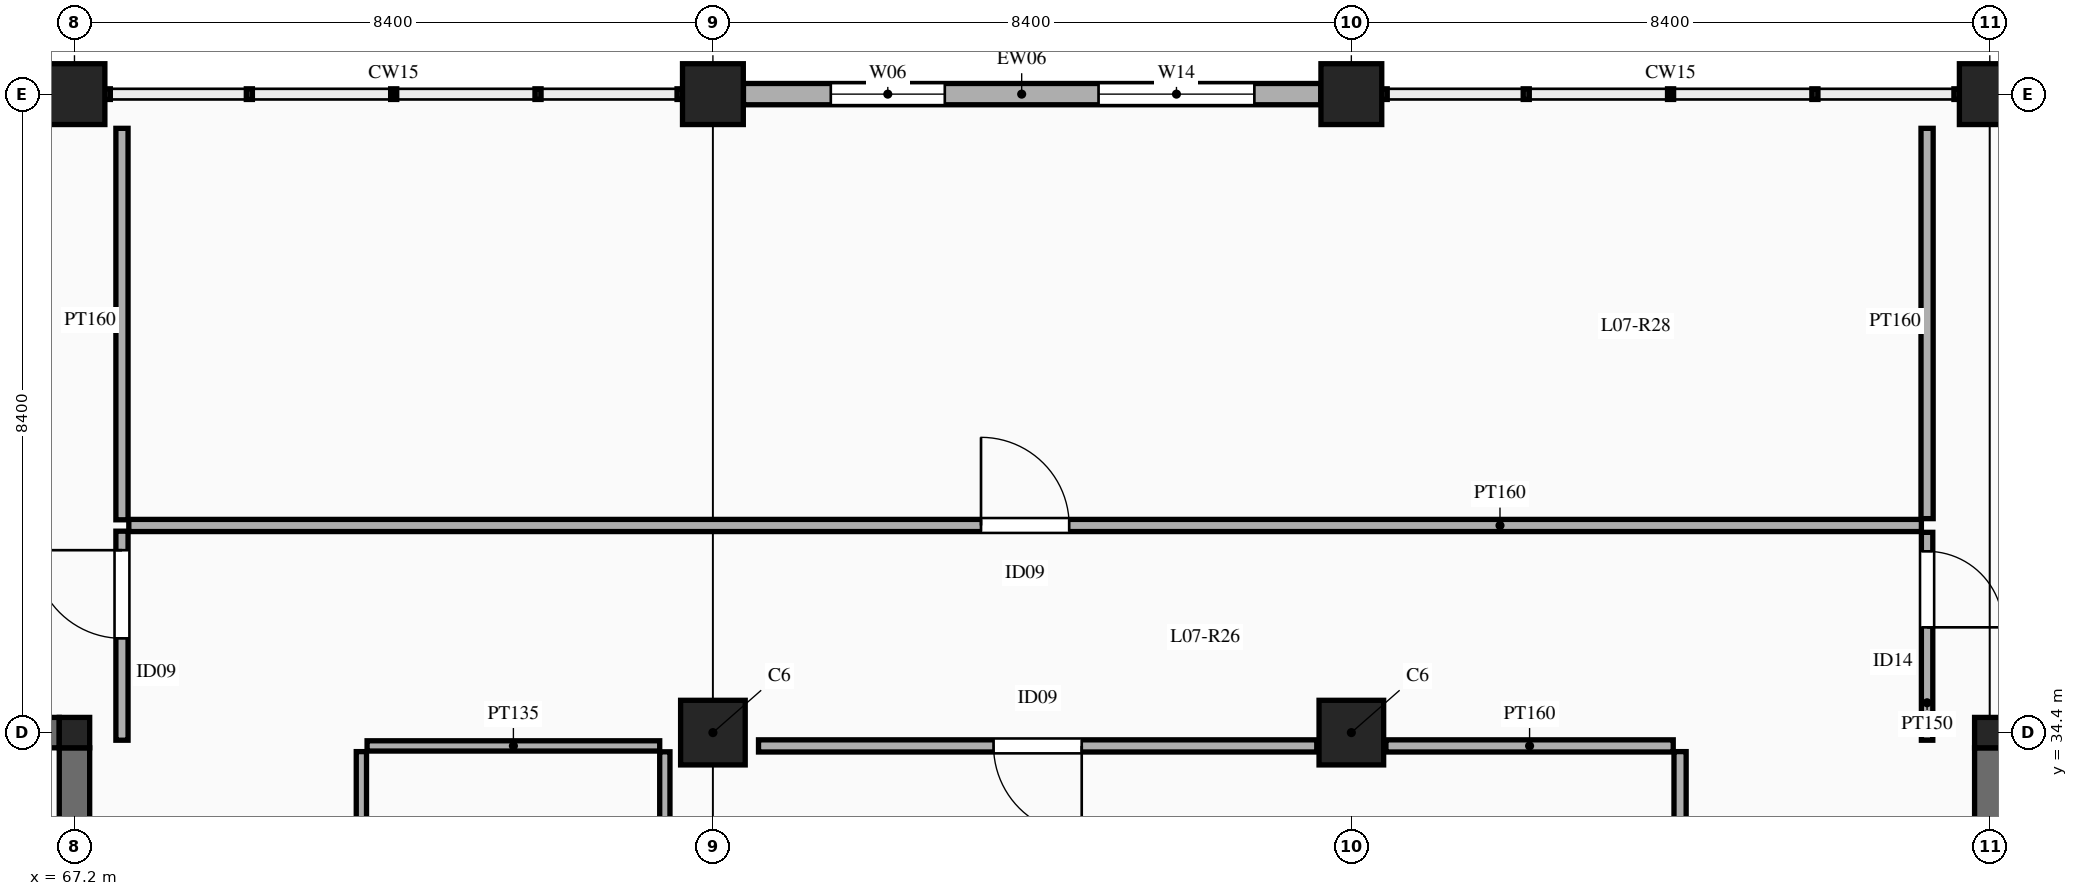
"""IFC4 building model, lengths in metres.
Left out: names, types, materials, properties, quantities, classifications, styles, units other than length and angle.
Written with IfcOpenShell. Run it as: python <this file> out.ifc"""

import sys

from ifc_helpers import new_model, si_unit, direction, frame, frame_2d, origin, origin_2d, place, context, subcontext, project, spatial, rectangle, extrude, element, fill, save


model = new_model("IFC4")
c1 = context("Model", 3, precision=1e-05, world=origin(), true_north=direction((0.0, 1.0)))
c2 = subcontext(c1, "Body", "Model", "MODEL_VIEW")
j1 = project(units=[si_unit("LENGTHUNIT", "METRE"), si_unit("PLANEANGLEUNIT", "RADIAN")], contexts=[c1])
p1 = place(None, origin())
s1 = spatial("IfcSite", under=j1, at=p1, CompositionType="ELEMENT")
p2 = place(p1, origin())
s2 = spatial("IfcBuilding", under=s1, at=p2, CompositionType="ELEMENT")
p3 = place(p2, frame((0.0, 0.0, 33.0)))
s3 = spatial("IfcBuildingStorey", under=s2, at=p3, CompositionType="ELEMENT", Elevation=33.0)
p4 = place(p3, frame((67.2, 34.4, 0.0), z_axis=(0.0, 0.0, 1.0), x_axis=(1.0, 0.0, 0.0)))
e1 = element("IfcColumn", 1, at=p4, inside=s3, PredefinedType="COLUMN", context=c2, shape_type="SweptSolid", body=[
    extrude(rectangle(XDim=0.4, YDim=0.4, at=origin_2d()), origin(), (0.0, 0.0, 1.0), 4.5),
])
p5 = place(p3, frame((67.2, 42.8, 0.0), z_axis=(0.0, 0.0, 1.0), x_axis=(1.0, 0.0, 0.0)))
e2 = element("IfcColumn", 2, at=p5, inside=s3, PredefinedType="COLUMN", context=c2, shape_type="SweptSolid", body=[
    extrude(rectangle(XDim=0.8, YDim=0.8, at=origin_2d()), origin(), (0.0, 0.0, 1.0), 4.5),
])
p6 = place(p3, frame((75.6, 34.4, 0.0), z_axis=(0.0, 0.0, 1.0), x_axis=(1.0, 0.0, 0.0)))
e3 = element("IfcColumn", 3, at=p6, inside=s3, PredefinedType="COLUMN", context=c2, shape_type="SweptSolid", body=[
    extrude(rectangle(XDim=0.85, YDim=0.85, at=origin_2d()), origin(), (0.0, 0.0, 1.0), 4.5),
])
p7 = place(p3, frame((75.6, 42.8, 0.0), z_axis=(0.0, 0.0, 1.0), x_axis=(1.0, 0.0, 0.0)))
e4 = element("IfcColumn", 4, at=p7, inside=s3, PredefinedType="COLUMN", context=c2, shape_type="SweptSolid", body=[
    extrude(rectangle(XDim=0.8, YDim=0.8, at=origin_2d()), origin(), (0.0, 0.0, 1.0), 4.5),
])
p8 = place(p3, frame((84.0, 34.4, 0.0), z_axis=(0.0, 0.0, 1.0), x_axis=(1.0, 0.0, 0.0)))
e5 = element("IfcColumn", 5, at=p8, inside=s3, PredefinedType="COLUMN", context=c2, shape_type="SweptSolid", body=[
    extrude(rectangle(XDim=0.85, YDim=0.85, at=origin_2d()), origin(), (0.0, 0.0, 1.0), 4.5),
])
p9 = place(p3, frame((84.0, 42.8, 0.0), z_axis=(0.0, 0.0, 1.0), x_axis=(1.0, 0.0, 0.0)))
e6 = element("IfcColumn", 6, at=p9, inside=s3, PredefinedType="COLUMN", context=c2, shape_type="SweptSolid", body=[
    extrude(rectangle(XDim=0.8, YDim=0.8, at=origin_2d()), origin(), (0.0, 0.0, 1.0), 4.5),
])
p10 = place(p3, frame((92.4, 34.4, 0.0), z_axis=(0.0, 0.0, 1.0), x_axis=(1.0, 0.0, 0.0)))
e7 = element("IfcColumn", 7, at=p10, inside=s3, PredefinedType="COLUMN", context=c2, shape_type="SweptSolid", body=[
    extrude(rectangle(XDim=0.4, YDim=0.4, at=origin_2d()), origin(), (0.0, 0.0, 1.0), 4.5),
])
p11 = place(p3, frame((92.4, 42.8, 0.0), z_axis=(0.0, 0.0, 1.0), x_axis=(1.0, 0.0, 0.0)))
e8 = element("IfcColumn", 8, at=p11, inside=s3, PredefinedType="COLUMN", context=c2, shape_type="SweptSolid", body=[
    extrude(rectangle(XDim=0.8, YDim=0.8, at=origin_2d()), origin(), (0.0, 0.0, 1.0), 4.5),
])
for number, where, z_axis, x_axis in (
    (9, (67.2, 26.2, 0.0), (0.0, 0.0, 1.0), (0.0, 1.0, 0.0)),
    (10, (59.0, 34.4, 0.0), (0.0, 0.0, 1.0), (1.0, 0.0, 0.0)),
    (11, (92.4, 26.2, 0.0), (0.0, 0.0, 1.0), (0.0, 1.0, 0.0)),
):
    element("IfcWall", number, at=place(p3, frame(where, z_axis=z_axis, x_axis=x_axis)), inside=s3, PredefinedType="SHEAR", context=c2, shape_type="SweptSolid", body=[
        extrude(rectangle(XDim=8.0, YDim=0.4, at=frame_2d((4.0, 0.0))), origin(), (0.0, 0.0, 1.0), 4.5),
    ])
p12 = place(p3, frame((76.002, 42.8, 0.0), z_axis=(0.0, 0.0, 1.0), x_axis=(1.0, 0.0, 0.0)))
e12 = element("IfcWall", 12, at=p12, inside=s3, PredefinedType="ELEMENTEDWALL", context=c2, shape_type="SweptSolid", body=[
    extrude(rectangle(XDim=7.596, YDim=0.28, at=frame_2d((3.798, 0.0))), origin(), (0.0, 0.0, 1.0), 3.55),
])
p13 = place(p12, frame((1.149, 0.0, 0.9)))
e13 = element("IfcOpeningElement", 13, at=p13, cuts=e12, PredefinedType="OPENING", context=c2, shape_type="SweptSolid", body=[
    extrude(rectangle(XDim=1.5, YDim=2.0, at=frame_2d((0.75, 1.0))), frame((0.0, 0.15, 0.0), z_axis=(0.0, -1.0, 0.0), x_axis=(1.0, 0.0, 0.0)), (0.0, 0.0, 1.0), 0.3),
])
p14 = place(p12, frame((4.672, 0.0, 0.9)))
e14 = element("IfcOpeningElement", 14, at=p14, cuts=e12, PredefinedType="OPENING", context=c2, shape_type="SweptSolid", body=[
    extrude(rectangle(XDim=2.05, YDim=2.1, at=frame_2d((1.025, 1.05))), frame((0.0, 0.15, 0.0), z_axis=(0.0, -1.0, 0.0), x_axis=(1.0, 0.0, 0.0)), (0.0, 0.0, 1.0), 0.3),
])
p15 = place(p3, frame((70.975, 30.25, 0.0), z_axis=(0.0, 0.0, 1.0), x_axis=(0.0, 1.0, 0.0)))
e15 = element("IfcWall", 15, at=p15, inside=s3, PredefinedType="PARTITIONING", context=c2, shape_type="SweptSolid", body=[
    extrude(rectangle(XDim=3.9, YDim=0.135, at=frame_2d((1.95, 0.0))), origin(), (0.0, 0.0, 1.0), 3.45),
])
p16 = place(p15, frame((1.46, 0.0, 0.0)))
e16 = element("IfcOpeningElement", 16, at=p16, cuts=e15, PredefinedType="OPENING", context=c2, shape_type="SweptSolid", body=[
    extrude(rectangle(XDim=0.98, YDim=2.15, at=frame_2d((0.49, 1.075))), frame((0.0, 0.077, 0.0), z_axis=(0.0, -1.0, 0.0), x_axis=(1.0, 0.0, 0.0)), (0.0, 0.0, 1.0), 0.155),
])
p17 = place(p3, frame((71.05, 34.225, 0.0), z_axis=(0.0, 0.0, 1.0), x_axis=(1.0, 0.0, 0.0)))
e17 = element("IfcWall", 17, at=p17, inside=s3, PredefinedType="PARTITIONING", context=c2, shape_type="SweptSolid", body=[
    extrude(rectangle(XDim=3.85, YDim=0.135, at=frame_2d((1.925, 0.0))), origin(), (0.0, 0.0, 1.0), 3.45),
])
p18 = place(p3, frame((88.325, 29.45, 0.0), z_axis=(0.0, 0.0, 1.0), x_axis=(0.0, 1.0, 0.0)))
e18 = element("IfcWall", 18, at=p18, inside=s3, PredefinedType="PARTITIONING", context=c2, shape_type="SweptSolid", body=[
    extrude(rectangle(XDim=4.7, YDim=0.16, at=frame_2d((2.35, 0.0))), origin(), (0.0, 0.0, 1.0), 3.45),
])
p19 = place(p3, frame((76.2, 34.225, 0.0), z_axis=(0.0, 0.0, 1.0), x_axis=(1.0, 0.0, 0.0)))
e19 = element("IfcWall", 19, at=p19, inside=s3, PredefinedType="PARTITIONING", context=c2, shape_type="SweptSolid", body=[
    extrude(rectangle(XDim=7.345, YDim=0.16, at=frame_2d((3.672, 0.0))), origin(), (0.0, 0.0, 1.0), 3.45),
])
p20 = place(p19, frame((3.093, 0.0, 0.0)))
e20 = element("IfcOpeningElement", 20, at=p20, cuts=e19, PredefinedType="OPENING", context=c2, shape_type="SweptSolid", body=[
    extrude(rectangle(XDim=1.16, YDim=2.2, at=frame_2d((0.58, 1.1))), frame((0.0, 0.09, 0.0), z_axis=(0.0, -1.0, 0.0), x_axis=(1.0, 0.0, 0.0)), (0.0, 0.0, 1.0), 0.18),
])
p21 = place(p3, frame((84.455, 34.225, 0.0), z_axis=(0.0, 0.0, 1.0), x_axis=(1.0, 0.0, 0.0)))
e21 = element("IfcWall", 21, at=p21, inside=s3, PredefinedType="PARTITIONING", context=c2, shape_type="SweptSolid", body=[
    extrude(rectangle(XDim=3.78, YDim=0.16, at=frame_2d((1.89, 0.0))), origin(), (0.0, 0.0, 1.0), 3.45),
])
p22 = place(p3, frame((67.825, 34.3, 0.0), z_axis=(0.0, 0.0, 1.0), x_axis=(0.0, 1.0, 0.0)))
e22 = element("IfcWall", 22, at=p22, inside=s3, PredefinedType="PARTITIONING", context=c2, shape_type="SweptSolid", body=[
    extrude(rectangle(XDim=2.75, YDim=0.16, at=frame_2d((1.375, 0.0))), origin(), (0.0, 0.0, 1.0), 3.45),
])
p23 = place(p22, frame((1.34, 0.0, 0.0)))
e23 = element("IfcOpeningElement", 23, at=p23, cuts=e22, PredefinedType="OPENING", context=c2, shape_type="SweptSolid", body=[
    extrude(rectangle(XDim=1.16, YDim=2.2, at=frame_2d((0.58, 1.1))), frame((0.0, 0.09, 0.0), z_axis=(0.0, -1.0, 0.0), x_axis=(1.0, 0.0, 0.0)), (0.0, 0.0, 1.0), 0.18),
])
p24 = place(p3, frame((67.915, 37.125, 0.0), z_axis=(0.0, 0.0, 1.0), x_axis=(1.0, 0.0, 0.0)))
e24 = element("IfcWall", 24, at=p24, inside=s3, PredefinedType="PARTITIONING", context=c2, shape_type="SweptSolid", body=[
    extrude(rectangle(XDim=23.585, YDim=0.16, at=frame_2d((11.792, 0.0))), origin(), (0.0, 0.0, 1.0), 3.45),
])
p25 = place(p24, frame((11.212, 0.0, 0.0)))
e25 = element("IfcOpeningElement", 25, at=p25, cuts=e24, PredefinedType="OPENING", context=c2, shape_type="SweptSolid", body=[
    extrude(rectangle(XDim=1.16, YDim=2.2, at=frame_2d((0.58, 1.1))), frame((0.0, 0.09, 0.0), z_axis=(0.0, -1.0, 0.0), x_axis=(1.0, 0.0, 0.0)), (0.0, 0.0, 1.0), 0.18),
])
p26 = place(p3, frame((91.575, 34.3, 0.0), z_axis=(0.0, 0.0, 1.0), x_axis=(0.0, 1.0, 0.0)))
e26 = element("IfcWall", 26, at=p26, inside=s3, PredefinedType="PARTITIONING", context=c2, shape_type="SweptSolid", body=[
    extrude(rectangle(XDim=2.735, YDim=0.15, at=frame_2d((1.367, 0.0))), origin(), (0.0, 0.0, 1.0), 3.45),
])
p27 = place(p26, frame((1.485, 0.0, 0.0)))
e27 = element("IfcOpeningElement", 27, at=p27, cuts=e26, PredefinedType="OPENING", context=c2, shape_type="SweptSolid", body=[
    extrude(rectangle(XDim=1.0, YDim=2.15, at=frame_2d((0.5, 1.075))), frame((0.0, 0.085, 0.0), z_axis=(0.0, -1.0, 0.0), x_axis=(1.0, 0.0, 0.0)), (0.0, 0.0, 1.0), 0.17),
])
p28 = place(p3, frame((67.825, 37.2, 0.0), z_axis=(0.0, 0.0, 1.0), x_axis=(0.0, 1.0, 0.0)))
e28 = element("IfcWall", 28, at=p28, inside=s3, PredefinedType="PARTITIONING", context=c2, shape_type="SweptSolid", body=[
    extrude(rectangle(XDim=5.15, YDim=0.16, at=frame_2d((2.575, 0.0))), origin(), (0.0, 0.0, 1.0), 3.45),
])
p29 = place(p3, frame((91.575, 37.215, 0.0), z_axis=(0.0, 0.0, 1.0), x_axis=(0.0, 1.0, 0.0)))
e29 = element("IfcWall", 29, at=p29, inside=s3, PredefinedType="PARTITIONING", context=c2, shape_type="SweptSolid", body=[
    extrude(rectangle(XDim=5.135, YDim=0.16, at=frame_2d((2.567, 0.0))), origin(), (0.0, 0.0, 1.0), 3.45),
])
p30 = place(p3, frame((74.968, 30.252, 0.0), z_axis=(0.0, 0.0, 1.0), x_axis=(0.0, 1.0, 0.0)))
e30 = element("IfcWall", 30, at=p30, inside=s3, PredefinedType="PARTITIONING", context=c2, shape_type="SweptSolid", body=[
    extrude(rectangle(XDim=3.895, YDim=0.135, at=frame_2d((1.948, 0.0))), origin(), (0.0, 0.0, 1.0), 3.45),
])
p31 = place(p13, origin())
e31 = element("IfcWindow", 31, at=p31, inside=s3, PartitioningType="DOUBLE_PANEL_VERTICAL", PredefinedType="WINDOW", context=c2, shape_type="SweptSolid", body=[
    extrude(rectangle(XDim=1.5, YDim=2.0, at=frame_2d((0.75, 1.0))), frame((0.0, 0.03, 0.0), z_axis=(0.0, -1.0, 0.0), x_axis=(1.0, 0.0, 0.0)), (0.0, 0.0, 1.0), 0.06),
])
fill(e13, e31)
p32 = place(p14, origin())
e32 = element("IfcWindow", 32, at=p32, inside=s3, PartitioningType="TRIPLE_PANEL_VERTICAL", PredefinedType="WINDOW", context=c2, shape_type="SweptSolid", body=[
    extrude(rectangle(XDim=2.05, YDim=2.1, at=frame_2d((1.025, 1.05))), frame((0.0, 0.03, 0.0), z_axis=(0.0, -1.0, 0.0), x_axis=(1.0, 0.0, 0.0)), (0.0, 0.0, 1.0), 0.06),
])
fill(e14, e32)
p33 = place(p20, frame((1.16, 0.0, 0.0), z_axis=(0.0, 0.0, 1.0), x_axis=(-1.0, 0.0, 0.0)))
e33 = element("IfcDoor", 33, at=p33, inside=s3, OperationType="SINGLE_SWING_LEFT", PredefinedType="DOOR", context=c2, shape_type="SweptSolid", body=[
    extrude(rectangle(XDim=1.16, YDim=2.2, at=frame_2d((0.58, 1.1))), frame((0.0, 0.025, 0.0), z_axis=(0.0, -1.0, 0.0), x_axis=(1.0, 0.0, 0.0)), (0.0, 0.0, 1.0), 0.05),
])
fill(e20, e33)
p34 = place(p23, origin())
e34 = element("IfcDoor", 34, at=p34, inside=s3, OperationType="SINGLE_SWING_RIGHT", PredefinedType="DOOR", context=c2, shape_type="SweptSolid", body=[
    extrude(rectangle(XDim=1.16, YDim=2.2, at=frame_2d((0.58, 1.1))), frame((0.0, 0.025, 0.0), z_axis=(0.0, -1.0, 0.0), x_axis=(1.0, 0.0, 0.0)), (0.0, 0.0, 1.0), 0.05),
])
fill(e23, e34)
p35 = place(p25, origin())
e35 = element("IfcDoor", 35, at=p35, inside=s3, OperationType="SINGLE_SWING_LEFT", PredefinedType="DOOR", context=c2, shape_type="SweptSolid", body=[
    extrude(rectangle(XDim=1.16, YDim=2.2, at=frame_2d((0.58, 1.1))), frame((0.0, 0.025, 0.0), z_axis=(0.0, -1.0, 0.0), x_axis=(1.0, 0.0, 0.0)), (0.0, 0.0, 1.0), 0.05),
])
fill(e25, e35)
p36 = place(p27, frame((1.0, 0.0, 0.0), z_axis=(0.0, 0.0, 1.0), x_axis=(-1.0, 0.0, 0.0)))
e36 = element("IfcDoor", 36, at=p36, inside=s3, OperationType="SINGLE_SWING_RIGHT", PredefinedType="DOOR", context=c2, shape_type="SweptSolid", body=[
    extrude(rectangle(XDim=1.0, YDim=2.15, at=frame_2d((0.5, 1.075))), frame((0.0, 0.025, 0.0), z_axis=(0.0, -1.0, 0.0), x_axis=(1.0, 0.0, 0.0)), (0.0, 0.0, 1.0), 0.05),
])
fill(e27, e36)
save(model, sys.argv[1])
